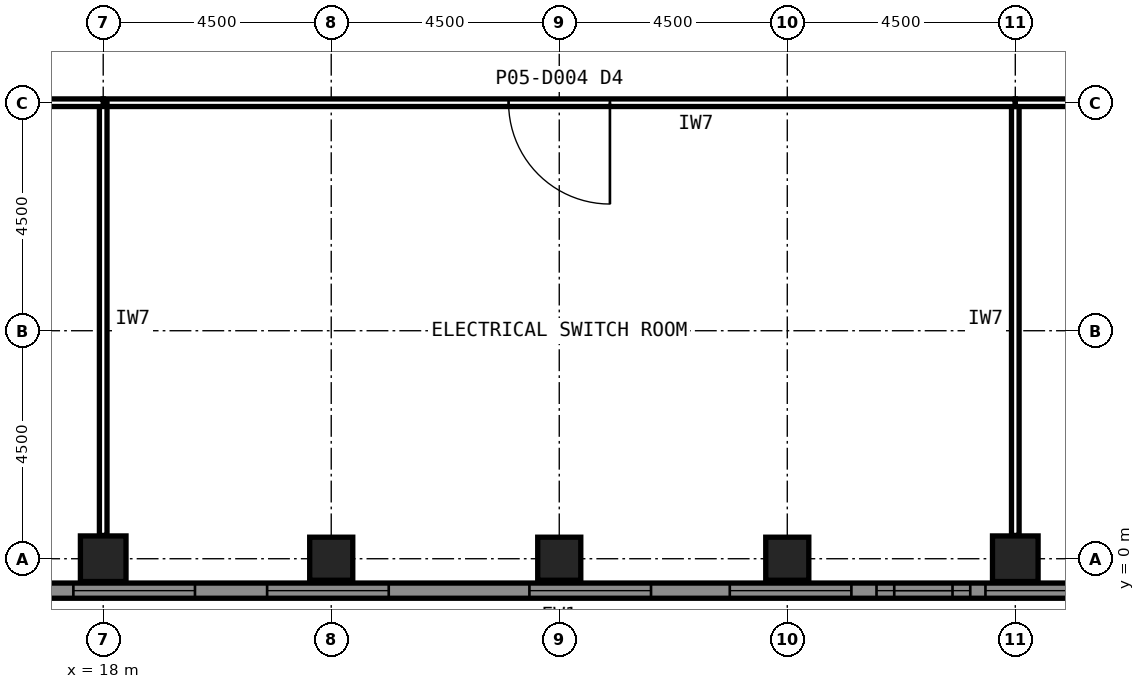
"""IFC4 building model, lengths in metres.
Left out: names, types, materials, properties, quantities, classifications, styles, units other than length and angle.
Written with IfcOpenShell. Run it as: python <this file> out.ifc"""

import sys

from ifc_helpers import new_model, si_unit, direction, frame, frame_2d, origin, origin_2d, place, context, subcontext, project, spatial, rectangle, hollow_rectangle, extrude, element, fill, save


model = new_model("IFC4")
c1 = context("Model", 3, precision=1e-05, world=origin(), true_north=direction((0.0, 1.0)))
c2 = subcontext(c1, "Body", "Model", "MODEL_VIEW")
j1 = project(units=[si_unit("LENGTHUNIT", "METRE"), si_unit("PLANEANGLEUNIT", "RADIAN")], contexts=[c1])
p1 = place(None, origin())
s1 = spatial("IfcSite", under=j1, at=p1, CompositionType="ELEMENT")
p2 = place(p1, origin())
s2 = spatial("IfcBuilding", under=s1, at=p2, CompositionType="ELEMENT")
p3 = place(p2, frame((0.0, 0.0, 23.0)))
s3 = spatial("IfcBuildingStorey", under=s2, at=p3, CompositionType="ELEMENT", Elevation=23.0)
p4 = place(p3, frame((18.0, 0.0, 0.0), z_axis=(0.0, 0.0, 1.0), x_axis=(1.0, 0.0, 0.0)))
e1 = element("IfcColumn", 1, at=p4, inside=s3, PredefinedType="COLUMN", context=c2, shape_type="SweptSolid", body=[
    extrude(hollow_rectangle(XDim=0.9, YDim=0.9, WallThickness=0.063, at=origin_2d()), origin(), (0.0, 0.0, 1.0), 6.0),
])
for number, where, z_axis, x_axis in (
    (2, (22.5, 0.0, 0.0), (0.0, 0.0, 1.0), (1.0, 0.0, 0.0)),
    (3, (27.0, 0.0, 0.0), (0.0, 0.0, 1.0), (1.0, 0.0, 0.0)),
    (4, (31.5, 0.0, 0.0), (0.0, 0.0, 1.0), (1.0, 0.0, 0.0)),
):
    element("IfcColumn", number, at=place(p3, frame(where, z_axis=z_axis, x_axis=x_axis)), inside=s3, PredefinedType="COLUMN", context=c2, shape_type="SweptSolid", body=[
        extrude(hollow_rectangle(XDim=0.85, YDim=0.85, WallThickness=0.05, at=origin_2d()), origin(), (0.0, 0.0, 1.0), 6.0),
    ])
p5 = place(p3, frame((36.0, 0.0, 0.0), z_axis=(0.0, 0.0, 1.0), x_axis=(1.0, 0.0, 0.0)))
e5 = element("IfcColumn", 5, at=p5, inside=s3, PredefinedType="COLUMN", context=c2, shape_type="SweptSolid", body=[
    extrude(hollow_rectangle(XDim=0.9, YDim=0.9, WallThickness=0.063, at=origin_2d()), origin(), (0.0, 0.0, 1.0), 6.0),
])
p6 = place(p3, frame((45.261, -0.63, 0.0), z_axis=(0.0, 0.0, 1.0), x_axis=(-1.0, 0.0, 0.0)))
e6 = element("IfcWall", 6, at=p6, inside=s3, PredefinedType="SOLIDWALL", context=c2, shape_type="SweptSolid", body=[
    extrude(rectangle(XDim=36.522, YDim=0.3, at=frame_2d((18.261, 0.0))), origin(), (0.0, 0.0, 1.0), 6.0),
])
p7 = place(p6, frame((0.3, 0.0, 0.3)))
e7 = element("IfcOpeningElement", 7, at=p7, cuts=e6, PredefinedType="OPENING", context=c2, shape_type="SweptSolid", body=[
    extrude(rectangle(XDim=1.5, YDim=2.0, at=frame_2d((0.75, 1.0))), frame((0.0, 0.16, 0.0), z_axis=(0.0, -1.0, 0.0), x_axis=(1.0, 0.0, 0.0)), (0.0, 0.0, 1.0), 0.32),
])
p8 = place(p6, frame((3.365, 0.0, 1.2)))
e8 = element("IfcOpeningElement", 8, at=p8, cuts=e6, PredefinedType="OPENING", context=c2, shape_type="SweptSolid", body=[
    extrude(rectangle(XDim=2.4, YDim=3.0, at=frame_2d((1.2, 1.5))), frame((0.0, 0.16, 0.0), z_axis=(0.0, -1.0, 0.0), x_axis=(1.0, 0.0, 0.0)), (0.0, 0.0, 1.0), 0.32),
])
p9 = place(p6, frame((1.5, 0.0, 3.65)))
e9 = element("IfcOpeningElement", 9, at=p9, cuts=e6, PredefinedType="OPENING", context=c2, shape_type="SweptSolid", body=[
    extrude(rectangle(XDim=1.5, YDim=2.0, at=frame_2d((0.75, 1.0))), frame((0.0, 0.16, 0.0), z_axis=(0.0, -1.0, 0.0), x_axis=(1.0, 0.0, 0.0)), (0.0, 0.0, 1.0), 0.32),
])
p10 = place(p6, frame((6.1, 0.0, 3.6)))
e10 = element("IfcOpeningElement", 10, at=p10, cuts=e6, PredefinedType="OPENING", context=c2, shape_type="SweptSolid", body=[
    extrude(rectangle(XDim=1.5, YDim=2.0, at=frame_2d((0.75, 1.0))), frame((0.0, 0.16, 0.0), z_axis=(0.0, -1.0, 0.0), x_axis=(1.0, 0.0, 0.0)), (0.0, 0.0, 1.0), 0.32),
])
p11 = place(p6, frame((12.496, 0.0, 1.2)))
e11 = element("IfcOpeningElement", 11, at=p11, cuts=e6, PredefinedType="OPENING", context=c2, shape_type="SweptSolid", body=[
    extrude(rectangle(XDim=2.4, YDim=3.0, at=frame_2d((1.2, 1.5))), frame((0.0, 0.16, 0.0), z_axis=(0.0, -1.0, 0.0), x_axis=(1.0, 0.0, 0.0)), (0.0, 0.0, 1.0), 0.32),
])
p12 = place(p6, frame((7.45, 0.0, 0.3)))
e12 = element("IfcOpeningElement", 12, at=p12, cuts=e6, PredefinedType="OPENING", context=c2, shape_type="SweptSolid", body=[
    extrude(rectangle(XDim=2.4, YDim=3.0, at=frame_2d((1.2, 1.5))), frame((0.0, 0.16, 0.0), z_axis=(0.0, -1.0, 0.0), x_axis=(1.0, 0.0, 0.0)), (0.0, 0.0, 1.0), 0.32),
])
p13 = place(p6, frame((10.15, 0.0, 0.3)))
e13 = element("IfcOpeningElement", 13, at=p13, cuts=e6, PredefinedType="OPENING", context=c2, shape_type="SweptSolid", body=[
    extrude(rectangle(XDim=1.5, YDim=2.0, at=frame_2d((0.75, 1.0))), frame((0.0, 0.16, 0.0), z_axis=(0.0, -1.0, 0.0), x_axis=(1.0, 0.0, 0.0)), (0.0, 0.0, 1.0), 0.32),
])
p14 = place(p6, frame((21.626, 0.0, 1.2)))
e14 = element("IfcOpeningElement", 14, at=p14, cuts=e6, PredefinedType="OPENING", context=c2, shape_type="SweptSolid", body=[
    extrude(rectangle(XDim=2.4, YDim=3.0, at=frame_2d((1.2, 1.5))), frame((0.0, 0.16, 0.0), z_axis=(0.0, -1.0, 0.0), x_axis=(1.0, 0.0, 0.0)), (0.0, 0.0, 1.0), 0.32),
])
p15 = place(p6, frame((10.5, 0.0, 3.65)))
e15 = element("IfcOpeningElement", 15, at=p15, cuts=e6, PredefinedType="OPENING", context=c2, shape_type="SweptSolid", body=[
    extrude(rectangle(XDim=1.5, YDim=2.0, at=frame_2d((0.75, 1.0))), frame((0.0, 0.16, 0.0), z_axis=(0.0, -1.0, 0.0), x_axis=(1.0, 0.0, 0.0)), (0.0, 0.0, 1.0), 0.32),
])
p16 = place(p6, frame((16.45, 0.0, 0.3)))
e16 = element("IfcOpeningElement", 16, at=p16, cuts=e6, PredefinedType="OPENING", context=c2, shape_type="SweptSolid", body=[
    extrude(rectangle(XDim=2.4, YDim=3.0, at=frame_2d((1.2, 1.5))), frame((0.0, 0.16, 0.0), z_axis=(0.0, -1.0, 0.0), x_axis=(1.0, 0.0, 0.0)), (0.0, 0.0, 1.0), 0.32),
])
p17 = place(p6, frame((30.757, 0.0, 1.2)))
e17 = element("IfcOpeningElement", 17, at=p17, cuts=e6, PredefinedType="OPENING", context=c2, shape_type="SweptSolid", body=[
    extrude(rectangle(XDim=2.4, YDim=3.0, at=frame_2d((1.2, 1.5))), frame((0.0, 0.16, 0.0), z_axis=(0.0, -1.0, 0.0), x_axis=(1.0, 0.0, 0.0)), (0.0, 0.0, 1.0), 0.32),
])
p18 = place(p6, frame((25.45, 0.0, 0.3)))
e18 = element("IfcOpeningElement", 18, at=p18, cuts=e6, PredefinedType="OPENING", context=c2, shape_type="SweptSolid", body=[
    extrude(rectangle(XDim=2.4, YDim=3.0, at=frame_2d((1.2, 1.5))), frame((0.0, 0.16, 0.0), z_axis=(0.0, -1.0, 0.0), x_axis=(1.0, 0.0, 0.0)), (0.0, 0.0, 1.0), 0.32),
])
p19 = place(p3, frame((36.0, 0.46, 0.0), z_axis=(0.0, 0.0, 1.0), x_axis=(0.0, 1.0, 0.0)))
e19 = element("IfcWall", 19, at=p19, inside=s3, PredefinedType="PARTITIONING", context=c2, shape_type="SweptSolid", body=[
    extrude(rectangle(XDim=8.54, YDim=0.15, at=frame_2d((4.27, 0.0))), origin(), (0.0, 0.0, 1.0), 4.989),
])
p20 = place(p3, frame((36.0, 9.0, 0.0), z_axis=(0.0, 0.0, 1.0), x_axis=(-1.0, 0.0, 0.0)))
e20 = element("IfcWall", 20, at=p20, inside=s3, PredefinedType="PARTITIONING", context=c2, shape_type="SweptSolid", body=[
    extrude(rectangle(XDim=18.0, YDim=0.15, at=frame_2d((9.0, 0.0))), origin(), (0.0, 0.0, 1.0), 5.84),
])
p21 = place(p20, frame((8.0, 0.0, 0.0)))
e21 = element("IfcOpeningElement", 21, at=p21, cuts=e20, PredefinedType="OPENING", context=c2, shape_type="SweptSolid", body=[
    extrude(rectangle(XDim=2.0, YDim=2.4, at=frame_2d((1.0, 1.2))), frame((0.0, 0.085, 0.0), z_axis=(0.0, -1.0, 0.0), x_axis=(1.0, 0.0, 0.0)), (0.0, 0.0, 1.0), 0.17),
])
p22 = place(p3, frame((18.0, 9.0, 0.0), z_axis=(0.0, 0.0, 1.0), x_axis=(0.0, -1.0, 0.0)))
e22 = element("IfcWall", 22, at=p22, inside=s3, PredefinedType="PARTITIONING", context=c2, shape_type="SweptSolid", body=[
    extrude(rectangle(XDim=8.54, YDim=0.15, at=frame_2d((4.27, 0.0))), origin(), (0.0, 0.0, 1.0), 4.989),
])
p23 = place(p3, frame((18.0, 9.0, 0.0), z_axis=(0.0, 0.0, 1.0), x_axis=(-1.0, 0.0, 0.0)))
e23 = element("IfcWall", 23, at=p23, inside=s3, PredefinedType="PARTITIONING", context=c2, shape_type="SweptSolid", body=[
    extrude(rectangle(XDim=17.565, YDim=0.15, at=frame_2d((8.782, 0.0))), origin(), (0.0, 0.0, 1.0), 5.229),
])
p24 = place(p23, frame((5.75, 0.0, 0.0)))
e24 = element("IfcOpeningElement", 24, at=p24, cuts=e23, PredefinedType="OPENING", context=c2, shape_type="SweptSolid", body=[
    extrude(rectangle(XDim=2.0, YDim=2.4, at=frame_2d((1.0, 1.2))), frame((0.0, 0.085, 0.0), z_axis=(0.0, -1.0, 0.0), x_axis=(1.0, 0.0, 0.0)), (0.0, 0.0, 1.0), 0.17),
])
p25 = place(p3, frame((53.565, 9.0, 0.0), z_axis=(0.0, 0.0, 1.0), x_axis=(-1.0, 0.0, 0.0)))
e25 = element("IfcWall", 25, at=p25, inside=s3, PredefinedType="PARTITIONING", context=c2, shape_type="SweptSolid", body=[
    extrude(rectangle(XDim=17.565, YDim=0.15, at=frame_2d((8.782, 0.0))), origin(), (0.0, 0.0, 1.0), 5.229),
])
p26 = place(p25, frame((9.5, 0.0, 0.0)))
e26 = element("IfcOpeningElement", 26, at=p26, cuts=e25, PredefinedType="OPENING", context=c2, shape_type="SweptSolid", body=[
    extrude(rectangle(XDim=2.0, YDim=2.4, at=frame_2d((1.0, 1.2))), frame((0.0, 0.085, 0.0), z_axis=(0.0, -1.0, 0.0), x_axis=(1.0, 0.0, 0.0)), (0.0, 0.0, 1.0), 0.17),
])
p27 = place(p11, origin())
e27 = element("IfcWindow", 27, at=p27, inside=s3, PartitioningType="SINGLE_PANEL", PredefinedType="USERDEFINED", context=c2, shape_type="SweptSolid", body=[
    extrude(rectangle(XDim=2.4, YDim=3.0, at=frame_2d((1.2, 1.5))), frame((0.0, 0.03, 0.0), z_axis=(0.0, -1.0, 0.0), x_axis=(1.0, 0.0, 0.0)), (0.0, 0.0, 1.0), 0.06),
])
fill(e11, e27)
p28 = place(p12, origin())
e28 = element("IfcWindow", 28, at=p28, inside=s3, PartitioningType="SINGLE_PANEL", PredefinedType="USERDEFINED", context=c2, shape_type="SweptSolid", body=[
    extrude(rectangle(XDim=2.4, YDim=3.0, at=frame_2d((1.2, 1.5))), frame((0.0, 0.03, 0.0), z_axis=(0.0, -1.0, 0.0), x_axis=(1.0, 0.0, 0.0)), (0.0, 0.0, 1.0), 0.06),
])
fill(e12, e28)
p29 = place(p13, origin())
e29 = element("IfcWindow", 29, at=p29, inside=s3, PartitioningType="SINGLE_PANEL", PredefinedType="USERDEFINED", context=c2, shape_type="SweptSolid", body=[
    extrude(rectangle(XDim=1.5, YDim=2.0, at=frame_2d((0.75, 1.0))), frame((0.0, 0.03, 0.0), z_axis=(0.0, -1.0, 0.0), x_axis=(1.0, 0.0, 0.0)), (0.0, 0.0, 1.0), 0.06),
])
fill(e13, e29)
p30 = place(p14, origin())
e30 = element("IfcWindow", 30, at=p30, inside=s3, PartitioningType="SINGLE_PANEL", PredefinedType="USERDEFINED", context=c2, shape_type="SweptSolid", body=[
    extrude(rectangle(XDim=2.4, YDim=3.0, at=frame_2d((1.2, 1.5))), frame((0.0, 0.03, 0.0), z_axis=(0.0, -1.0, 0.0), x_axis=(1.0, 0.0, 0.0)), (0.0, 0.0, 1.0), 0.06),
])
fill(e14, e30)
p31 = place(p15, origin())
e31 = element("IfcWindow", 31, at=p31, inside=s3, PartitioningType="SINGLE_PANEL", PredefinedType="USERDEFINED", context=c2, shape_type="SweptSolid", body=[
    extrude(rectangle(XDim=1.5, YDim=2.0, at=frame_2d((0.75, 1.0))), frame((0.0, 0.03, 0.0), z_axis=(0.0, -1.0, 0.0), x_axis=(1.0, 0.0, 0.0)), (0.0, 0.0, 1.0), 0.06),
])
fill(e15, e31)
p32 = place(p16, origin())
e32 = element("IfcWindow", 32, at=p32, inside=s3, PartitioningType="SINGLE_PANEL", PredefinedType="USERDEFINED", context=c2, shape_type="SweptSolid", body=[
    extrude(rectangle(XDim=2.4, YDim=3.0, at=frame_2d((1.2, 1.5))), frame((0.0, 0.03, 0.0), z_axis=(0.0, -1.0, 0.0), x_axis=(1.0, 0.0, 0.0)), (0.0, 0.0, 1.0), 0.06),
])
fill(e16, e32)
p33 = place(p18, origin())
e33 = element("IfcWindow", 33, at=p33, inside=s3, PartitioningType="SINGLE_PANEL", PredefinedType="USERDEFINED", context=c2, shape_type="SweptSolid", body=[
    extrude(rectangle(XDim=2.4, YDim=3.0, at=frame_2d((1.2, 1.5))), frame((0.0, 0.03, 0.0), z_axis=(0.0, -1.0, 0.0), x_axis=(1.0, 0.0, 0.0)), (0.0, 0.0, 1.0), 0.06),
])
fill(e18, e33)
p34 = place(p21, origin())
e34 = element("IfcDoor", 34, at=p34, inside=s3, OperationType="SINGLE_SWING_LEFT", PredefinedType="DOOR", context=c2, shape_type="SweptSolid", body=[
    extrude(rectangle(XDim=2.0, YDim=2.4, at=frame_2d((1.0, 1.2))), frame((0.0, 0.025, 0.0), z_axis=(0.0, -1.0, 0.0), x_axis=(1.0, 0.0, 0.0)), (0.0, 0.0, 1.0), 0.05),
])
fill(e21, e34)
save(model, sys.argv[1])
